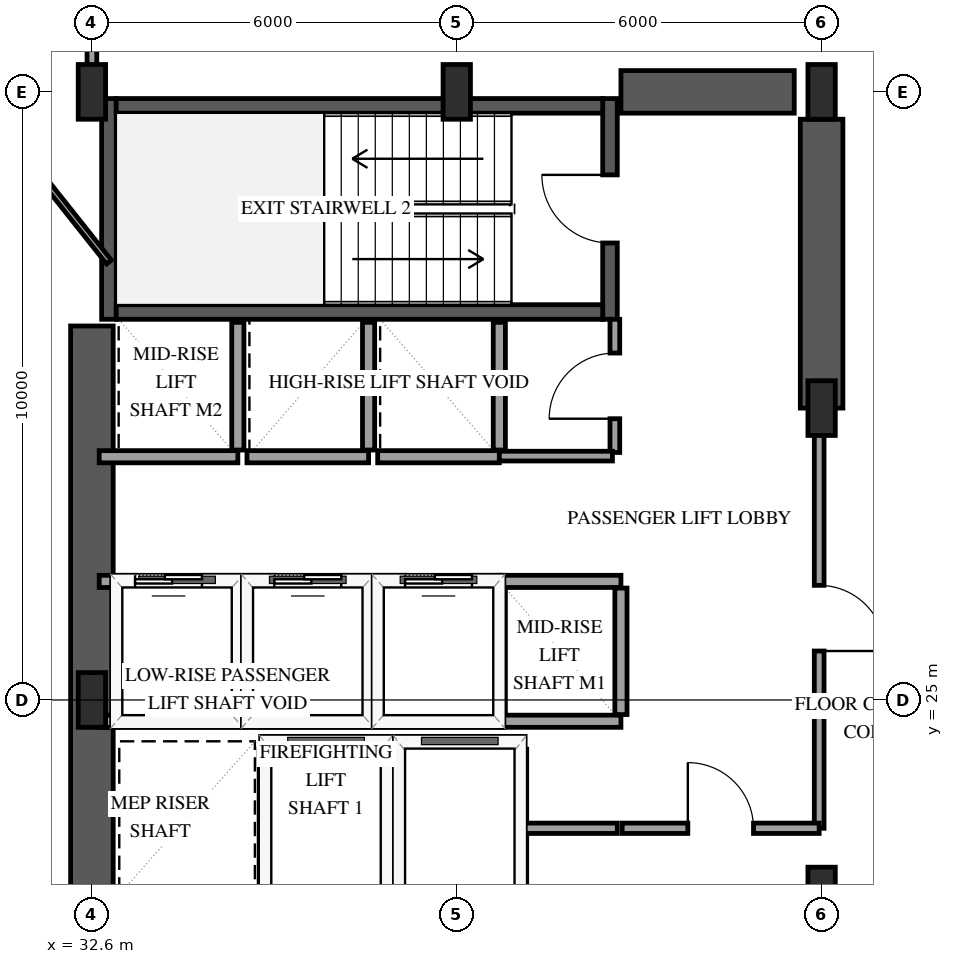
"""IFC4 building model, lengths in metres.
Left out: names, types, materials, properties, quantities, classifications, styles, units other than length and angle.
Written with IfcOpenShell. Run it as: python <this file> out.ifc"""

import sys

from ifc_helpers import new_model, si_unit, direction, frame, frame_2d, origin, origin_2d, place, context, subcontext, project, spatial, rectangle, extrude, element, fill, save


model = new_model("IFC4")
c1 = context("Model", 3, precision=1e-05, world=origin(), true_north=direction((0.0, 1.0)))
c2 = subcontext(c1, "Body", "Model", "MODEL_VIEW")
j1 = project(units=[si_unit("LENGTHUNIT", "METRE"), si_unit("PLANEANGLEUNIT", "RADIAN")], contexts=[c1])
p1 = place(None, origin())
s1 = spatial("IfcSite", under=j1, at=p1, CompositionType="ELEMENT")
p2 = place(p1, origin())
s2 = spatial("IfcBuilding", under=s1, at=p2, CompositionType="ELEMENT")
p3 = place(p2, frame((0.0, 0.0, 42.6)))
s3 = spatial("IfcBuildingStorey", under=s2, at=p3, CompositionType="ELEMENT", Elevation=42.6)
p4 = place(p3, frame((32.88, 31.26, 0.0), z_axis=(0.0, 0.0, 1.0), x_axis=(0.0, 1.0, 0.0)))
e1 = element("IfcWall", 1, at=p4, inside=s3, PredefinedType="SHEAR", context=c2, shape_type="SweptSolid", body=[
    extrude(rectangle(XDim=3.63, YDim=0.24, at=frame_2d((1.815, 0.0))), origin(), (0.0, 0.0, 1.0), 4.0),
])
p5 = place(p3, frame((41.12, 31.26, 0.0), z_axis=(0.0, 0.0, 1.0), x_axis=(0.0, 1.0, 0.0)))
e2 = element("IfcWall", 2, at=p5, inside=s3, PredefinedType="SHEAR", context=c2, shape_type="SweptSolid", body=[
    extrude(rectangle(XDim=3.63, YDim=0.24, at=frame_2d((1.815, 0.0))), origin(), (0.0, 0.0, 1.0), 4.0),
])
p6 = place(p5, frame((1.255, 0.0, 0.0)))
e3 = element("IfcOpeningElement", 3, at=p6, cuts=e2, PredefinedType="OPENING", context=c2, shape_type="SweptSolid", body=[
    extrude(rectangle(XDim=1.12, YDim=2.15, at=frame_2d((0.56, 1.075))), frame((0.0, 0.13, 0.0), z_axis=(0.0, -1.0, 0.0), x_axis=(1.0, 0.0, 0.0)), (0.0, 0.0, 1.0), 0.26),
])
for number, where, z_axis, x_axis in (
    (4, (33.0, 31.38, 0.0), (0.0, 0.0, 1.0), (1.0, 0.0, 0.0)),
    (5, (33.0, 34.77, 0.0), (0.0, 0.0, 1.0), (1.0, 0.0, 0.0)),
):
    element("IfcWall", number, at=place(p3, frame(where, z_axis=z_axis, x_axis=x_axis)), inside=s3, PredefinedType="SHEAR", context=c2, shape_type="SweptSolid", body=[
        extrude(rectangle(XDim=8.0, YDim=0.24, at=frame_2d((4.0, 0.0))), origin(), (0.0, 0.0, 1.0), 4.0),
    ])
p7 = place(p3, frame((32.6, 18.85, 0.0), z_axis=(0.0, 0.0, 1.0), x_axis=(0.0, 1.0, 0.0)))
e6 = element("IfcWall", 6, at=p7, inside=s3, PredefinedType="SHEAR", context=c2, shape_type="SweptSolid", body=[
    extrude(rectangle(XDim=12.3, YDim=0.7, at=frame_2d((6.15, 0.0))), origin(), (0.0, 0.0, 1.0), 4.0),
])
p8 = place(p3, frame((41.3, 35.0, 0.0), z_axis=(0.0, 0.0, 1.0), x_axis=(1.0, 0.0, 0.0)))
e7 = element("IfcWall", 7, at=p8, inside=s3, PredefinedType="SHEAR", context=c2, shape_type="SweptSolid", body=[
    extrude(rectangle(XDim=2.85, YDim=0.7, at=frame_2d((1.425, 0.0))), origin(), (0.0, 0.0, 1.0), 4.0),
])
p9 = place(p3, frame((44.6, 29.8, 0.0), z_axis=(0.0, 0.0, 1.0), x_axis=(0.0, 1.0, 0.0)))
e8 = element("IfcWall", 8, at=p9, inside=s3, PredefinedType="SHEAR", context=c2, shape_type="SweptSolid", body=[
    extrude(rectangle(XDim=4.75, YDim=0.7, at=frame_2d((2.375, 0.0))), origin(), (0.0, 0.0, 1.0), 4.0),
])
for number, where, z_axis, x_axis in (
    (9, (32.6, 25.0, 0.0), (0.0, 0.0, 1.0), (1.0, 0.0, 0.0)),
    (10, (32.6, 35.0, 0.0), (0.0, 0.0, 1.0), (1.0, 0.0, 0.0)),
    (11, (38.6, 35.0, 0.0), (0.0, 0.0, 1.0), (1.0, 0.0, 0.0)),
    (12, (44.6, 21.8, 0.0), (0.0, 0.0, 1.0), (1.0, 0.0, 0.0)),
    (13, (44.6, 29.8, 0.0), (0.0, 0.0, 1.0), (1.0, 0.0, 0.0)),
    (14, (44.6, 35.0, 0.0), (0.0, 0.0, 1.0), (1.0, 0.0, 0.0)),
):
    element("IfcColumn", number, at=place(p3, frame(where, z_axis=z_axis, x_axis=x_axis)), inside=s3, PredefinedType="PILASTER", context=c2, shape_type="SweptSolid", body=[
        extrude(rectangle(XDim=0.45, YDim=0.9, at=origin_2d()), origin(), (0.0, 0.0, 1.0), 4.0),
    ])
p10 = place(p3, frame((35.45, 24.3, 0.0), z_axis=(0.0, 0.0, 1.0), x_axis=(1.0, 0.0, 0.0)))
e15 = element("IfcWall", 15, at=p10, inside=s3, PredefinedType="SOLIDWALL", context=c2, shape_type="SweptSolid", body=[
    extrude(rectangle(XDim=2.0, YDim=0.2, at=frame_2d((1.0, 0.0))), origin(), (0.0, 0.0, 1.0), 3.7),
])
for number, where, z_axis, x_axis in (
    (16, (35.45, 21.81, 0.0), (0.0, 0.0, 1.0), (0.0, 1.0, 0.0)),
    (17, (37.45, 21.81, 0.0), (0.0, 0.0, 1.0), (0.0, 1.0, 0.0)),
):
    element("IfcWall", number, at=place(p3, frame(where, z_axis=z_axis, x_axis=x_axis)), inside=s3, PredefinedType="SOLIDWALL", context=c2, shape_type="SweptSolid", body=[
        extrude(rectangle(XDim=2.38, YDim=0.2, at=frame_2d((1.19, 0.0))), origin(), (0.0, 0.0, 1.0), 3.7),
    ])
p11 = place(p3, frame((37.65, 24.3, 0.0), z_axis=(0.0, 0.0, 1.0), x_axis=(1.0, 0.0, 0.0)))
e18 = element("IfcWall", 18, at=p11, inside=s3, PredefinedType="SOLIDWALL", context=c2, shape_type="SweptSolid", body=[
    extrude(rectangle(XDim=2.0, YDim=0.2, at=frame_2d((1.0, 0.0))), origin(), (0.0, 0.0, 1.0), 3.7),
])
p12 = place(p3, frame((39.65, 21.81, 0.0), z_axis=(0.0, 0.0, 1.0), x_axis=(0.0, 1.0, 0.0)))
e19 = element("IfcWall", 19, at=p12, inside=s3, PredefinedType="SOLIDWALL", context=c2, shape_type="SweptSolid", body=[
    extrude(rectangle(XDim=2.38, YDim=0.2, at=frame_2d((1.19, 0.0))), origin(), (0.0, 0.0, 1.0), 3.7),
])
p13 = place(p3, frame((32.72, 24.65, 0.0), z_axis=(0.0, 0.0, 1.0), x_axis=(1.0, 0.0, 0.0)))
e20 = element("IfcWall", 20, at=p13, inside=s3, PredefinedType="SOLIDWALL", context=c2, shape_type="SweptSolid", body=[
    extrude(rectangle(XDim=2.28, YDim=0.2, at=frame_2d((1.14, 0.0))), origin(), (0.0, 0.0, 1.0), 3.7),
])
p14 = place(p3, frame((32.72, 26.95, 0.0), z_axis=(0.0, 0.0, 1.0), x_axis=(1.0, 0.0, 0.0)))
e21 = element("IfcWall", 21, at=p14, inside=s3, PredefinedType="SOLIDWALL", context=c2, shape_type="SweptSolid", body=[
    extrude(rectangle(XDim=2.28, YDim=0.2, at=frame_2d((1.14, 0.0))), origin(), (0.0, 0.0, 1.0), 3.7),
])
p15 = place(p14, frame((0.59, 0.0, 0.0)))
e22 = element("IfcOpeningElement", 22, at=p15, cuts=e21, PredefinedType="OPENING", context=c2, shape_type="SweptSolid", body=[
    extrude(rectangle(XDim=1.1, YDim=2.15, at=frame_2d((0.55, 1.075))), frame((0.0, 0.11, 0.0), z_axis=(0.0, -1.0, 0.0), x_axis=(1.0, 0.0, 0.0)), (0.0, 0.0, 1.0), 0.22),
])
p16 = place(p3, frame((35.0, 24.76, 0.0), z_axis=(0.0, 0.0, 1.0), x_axis=(0.0, 1.0, 0.0)))
e23 = element("IfcWall", 23, at=p16, inside=s3, PredefinedType="SOLIDWALL", context=c2, shape_type="SweptSolid", body=[
    extrude(rectangle(XDim=2.08, YDim=0.2, at=frame_2d((1.04, 0.0))), origin(), (0.0, 0.0, 1.0), 3.7),
])
p17 = place(p3, frame((35.15, 24.65, 0.0), z_axis=(0.0, 0.0, 1.0), x_axis=(1.0, 0.0, 0.0)))
e24 = element("IfcWall", 24, at=p17, inside=s3, PredefinedType="SOLIDWALL", context=c2, shape_type="SweptSolid", body=[
    extrude(rectangle(XDim=2.0, YDim=0.2, at=frame_2d((1.0, 0.0))), origin(), (0.0, 0.0, 1.0), 3.7),
])
p18 = place(p3, frame((35.15, 26.95, 0.0), z_axis=(0.0, 0.0, 1.0), x_axis=(1.0, 0.0, 0.0)))
e25 = element("IfcWall", 25, at=p18, inside=s3, PredefinedType="SOLIDWALL", context=c2, shape_type="SweptSolid", body=[
    extrude(rectangle(XDim=2.0, YDim=0.2, at=frame_2d((1.0, 0.0))), origin(), (0.0, 0.0, 1.0), 3.7),
])
p19 = place(p18, frame((0.45, 0.0, 0.0)))
e26 = element("IfcOpeningElement", 26, at=p19, cuts=e25, PredefinedType="OPENING", context=c2, shape_type="SweptSolid", body=[
    extrude(rectangle(XDim=1.1, YDim=2.15, at=frame_2d((0.55, 1.075))), frame((0.0, 0.11, 0.0), z_axis=(0.0, -1.0, 0.0), x_axis=(1.0, 0.0, 0.0)), (0.0, 0.0, 1.0), 0.22),
])
p20 = place(p3, frame((37.15, 24.76, 0.0), z_axis=(0.0, 0.0, 1.0), x_axis=(0.0, 1.0, 0.0)))
e27 = element("IfcWall", 27, at=p20, inside=s3, PredefinedType="SOLIDWALL", context=c2, shape_type="SweptSolid", body=[
    extrude(rectangle(XDim=2.08, YDim=0.2, at=frame_2d((1.04, 0.0))), origin(), (0.0, 0.0, 1.0), 3.7),
])
p21 = place(p3, frame((37.3, 24.65, 0.0), z_axis=(0.0, 0.0, 1.0), x_axis=(1.0, 0.0, 0.0)))
e28 = element("IfcWall", 28, at=p21, inside=s3, PredefinedType="SOLIDWALL", context=c2, shape_type="SweptSolid", body=[
    extrude(rectangle(XDim=2.0, YDim=0.2, at=frame_2d((1.0, 0.0))), origin(), (0.0, 0.0, 1.0), 3.7),
])
p22 = place(p3, frame((37.3, 26.95, 0.0), z_axis=(0.0, 0.0, 1.0), x_axis=(1.0, 0.0, 0.0)))
e29 = element("IfcWall", 29, at=p22, inside=s3, PredefinedType="SOLIDWALL", context=c2, shape_type="SweptSolid", body=[
    extrude(rectangle(XDim=2.0, YDim=0.2, at=frame_2d((1.0, 0.0))), origin(), (0.0, 0.0, 1.0), 3.7),
])
p23 = place(p22, frame((0.45, 0.0, 0.0)))
e30 = element("IfcOpeningElement", 30, at=p23, cuts=e29, PredefinedType="OPENING", context=c2, shape_type="SweptSolid", body=[
    extrude(rectangle(XDim=1.1, YDim=2.15, at=frame_2d((0.55, 1.075))), frame((0.0, 0.11, 0.0), z_axis=(0.0, -1.0, 0.0), x_axis=(1.0, 0.0, 0.0)), (0.0, 0.0, 1.0), 0.22),
])
p24 = place(p3, frame((39.3, 24.76, 0.0), z_axis=(0.0, 0.0, 1.0), x_axis=(0.0, 1.0, 0.0)))
e31 = element("IfcWall", 31, at=p24, inside=s3, PredefinedType="SOLIDWALL", context=c2, shape_type="SweptSolid", body=[
    extrude(rectangle(XDim=2.08, YDim=0.2, at=frame_2d((1.04, 0.0))), origin(), (0.0, 0.0, 1.0), 3.7),
])
for number, where, z_axis, x_axis in (
    (32, (39.3, 24.65, 0.0), (0.0, 0.0, 1.0), (1.0, 0.0, 0.0)),
    (33, (39.3, 26.95, 0.0), (0.0, 0.0, 1.0), (1.0, 0.0, 0.0)),
):
    element("IfcWall", number, at=place(p3, frame(where, z_axis=z_axis, x_axis=x_axis)), inside=s3, PredefinedType="SOLIDWALL", context=c2, shape_type="SweptSolid", body=[
        extrude(rectangle(XDim=2.0, YDim=0.2, at=frame_2d((1.0, 0.0))), origin(), (0.0, 0.0, 1.0), 3.7),
    ])
p25 = place(p3, frame((41.3, 24.76, 0.0), z_axis=(0.0, 0.0, 1.0), x_axis=(0.0, 1.0, 0.0)))
e34 = element("IfcWall", 34, at=p25, inside=s3, PredefinedType="SOLIDWALL", context=c2, shape_type="SweptSolid", body=[
    extrude(rectangle(XDim=2.08, YDim=0.2, at=frame_2d((1.04, 0.0))), origin(), (0.0, 0.0, 1.0), 3.7),
])
p26 = place(p3, frame((32.72, 29.0, 0.0), z_axis=(0.0, 0.0, 1.0), x_axis=(1.0, 0.0, 0.0)))
e35 = element("IfcWall", 35, at=p26, inside=s3, PredefinedType="SOLIDWALL", context=c2, shape_type="SweptSolid", body=[
    extrude(rectangle(XDim=2.28, YDim=0.2, at=frame_2d((1.14, 0.0))), origin(), (0.0, 0.0, 1.0), 3.7),
])
p27 = place(p3, frame((35.0, 29.11, 0.0), z_axis=(0.0, 0.0, 1.0), x_axis=(0.0, 1.0, 0.0)))
e36 = element("IfcWall", 36, at=p27, inside=s3, PredefinedType="SOLIDWALL", context=c2, shape_type="SweptSolid", body=[
    extrude(rectangle(XDim=2.1, YDim=0.2, at=frame_2d((1.05, 0.0))), origin(), (0.0, 0.0, 1.0), 3.7),
])
p28 = place(p3, frame((35.15, 29.0, 0.0), z_axis=(0.0, 0.0, 1.0), x_axis=(1.0, 0.0, 0.0)))
e37 = element("IfcWall", 37, at=p28, inside=s3, PredefinedType="SOLIDWALL", context=c2, shape_type="SweptSolid", body=[
    extrude(rectangle(XDim=2.0, YDim=0.2, at=frame_2d((1.0, 0.0))), origin(), (0.0, 0.0, 1.0), 3.7),
])
p29 = place(p3, frame((37.15, 29.11, 0.0), z_axis=(0.0, 0.0, 1.0), x_axis=(0.0, 1.0, 0.0)))
e38 = element("IfcWall", 38, at=p29, inside=s3, PredefinedType="SOLIDWALL", context=c2, shape_type="SweptSolid", body=[
    extrude(rectangle(XDim=2.1, YDim=0.2, at=frame_2d((1.05, 0.0))), origin(), (0.0, 0.0, 1.0), 3.7),
])
p30 = place(p3, frame((37.3, 29.0, 0.0), z_axis=(0.0, 0.0, 1.0), x_axis=(1.0, 0.0, 0.0)))
e39 = element("IfcWall", 39, at=p30, inside=s3, PredefinedType="SOLIDWALL", context=c2, shape_type="SweptSolid", body=[
    extrude(rectangle(XDim=2.0, YDim=0.2, at=frame_2d((1.0, 0.0))), origin(), (0.0, 0.0, 1.0), 3.7),
])
p31 = place(p3, frame((39.3, 29.11, 0.0), z_axis=(0.0, 0.0, 1.0), x_axis=(0.0, 1.0, 0.0)))
e40 = element("IfcWall", 40, at=p31, inside=s3, PredefinedType="SOLIDWALL", context=c2, shape_type="SweptSolid", body=[
    extrude(rectangle(XDim=2.1, YDim=0.2, at=frame_2d((1.05, 0.0))), origin(), (0.0, 0.0, 1.0), 3.7),
])
p32 = place(p3, frame((32.88, 32.202, 0.0), z_axis=(0.0, 0.0, 1.0), x_axis=(-0.621839537778, 0.783144679645, 0.0)))
e41 = element("IfcWall", 41, at=p32, inside=s3, PredefinedType="PARTITIONING", context=c2, shape_type="SweptSolid", body=[
    extrude(rectangle(XDim=7.132, YDim=0.1, at=frame_2d((3.566, 0.0))), origin(), (0.0, 0.0, 1.0), 3.7),
])
p33 = place(p3, frame((44.56, 29.8, 0.0), z_axis=(0.0, 0.0, 1.0), x_axis=(0.0, -1.0, 0.0)))
e42 = element("IfcWall", 42, at=p33, inside=s3, PredefinedType="PARTITIONING", context=c2, shape_type="SweptSolid", body=[
    extrude(rectangle(XDim=6.91, YDim=0.16, at=frame_2d((3.455, 0.0))), origin(), (0.0, 0.0, 1.0), 2.74),
])
p34 = place(p33, frame((2.915, 0.0, 0.0)))
e43 = element("IfcOpeningElement", 43, at=p34, cuts=e42, PredefinedType="OPENING", context=c2, shape_type="SweptSolid", body=[
    extrude(rectangle(XDim=1.08, YDim=2.15, at=frame_2d((0.54, 1.075))), frame((0.0, 0.09, 0.0), z_axis=(0.0, -1.0, 0.0), x_axis=(1.0, 0.0, 0.0)), (0.0, 0.0, 1.0), 0.18),
])
p35 = place(p3, frame((41.32, 22.89, 0.0), z_axis=(0.0, 0.0, 1.0), x_axis=(1.0, 0.0, 0.0)))
e44 = element("IfcWall", 44, at=p35, inside=s3, PredefinedType="PARTITIONING", context=c2, shape_type="SweptSolid", body=[
    extrude(rectangle(XDim=3.24, YDim=0.17, at=frame_2d((1.62, 0.0))), origin(), (0.0, 0.0, 1.0), 3.7),
])
p36 = place(p35, frame((1.08, 0.0, 0.0)))
e45 = element("IfcOpeningElement", 45, at=p36, cuts=e44, PredefinedType="OPENING", context=c2, shape_type="SweptSolid", body=[
    extrude(rectangle(XDim=1.08, YDim=2.15, at=frame_2d((0.54, 1.075))), frame((0.0, 0.095, 0.0), z_axis=(0.0, -1.0, 0.0), x_axis=(1.0, 0.0, 0.0)), (0.0, 0.0, 1.0), 0.19),
])
p37 = place(p3, frame((41.2, 29.07, 0.0), z_axis=(0.0, 0.0, 1.0), x_axis=(0.0, 1.0, 0.0)))
e46 = element("IfcWall", 46, at=p37, inside=s3, PredefinedType="PARTITIONING", context=c2, shape_type="SweptSolid", body=[
    extrude(rectangle(XDim=2.19, YDim=0.16, at=frame_2d((1.095, 0.0))), origin(), (0.0, 0.0, 1.0), 3.7),
])
p38 = place(p37, frame((0.555, 0.0, 0.0)))
e47 = element("IfcOpeningElement", 47, at=p38, cuts=e46, PredefinedType="OPENING", context=c2, shape_type="SweptSolid", body=[
    extrude(rectangle(XDim=1.08, YDim=2.15, at=frame_2d((0.54, 1.075))), frame((0.0, 0.09, 0.0), z_axis=(0.0, -1.0, 0.0), x_axis=(1.0, 0.0, 0.0)), (0.0, 0.0, 1.0), 0.18),
])
p39 = place(p3, frame((32.6, 35.07, 0.0), z_axis=(0.0, 0.0, 1.0), x_axis=(0.0, 1.0, 0.0)))
e48 = element("IfcWall", 48, at=p39, inside=s3, PredefinedType="PARTITIONING", context=c2, shape_type="SweptSolid", body=[
    extrude(rectangle(XDim=1.91, YDim=0.16, at=frame_2d((0.955, 0.0))), origin(), (0.0, 0.0, 1.0), 3.7),
])
p40 = place(p3, frame((39.3, 29.01, 0.0), z_axis=(0.0, 0.0, 1.0), x_axis=(1.0, 0.0, 0.0)))
e49 = element("IfcWall", 49, at=p40, inside=s3, PredefinedType="PARTITIONING", context=c2, shape_type="SweptSolid", body=[
    extrude(rectangle(XDim=1.86, YDim=0.16, at=frame_2d((0.93, 0.0))), origin(), (0.0, 0.0, 1.0), 3.7),
])
p41 = place(p3, frame((39.72, 22.89, 0.0), z_axis=(0.0, 0.0, 1.0), x_axis=(1.0, 0.0, 0.0)))
e50 = element("IfcWall", 50, at=p41, inside=s3, PredefinedType="PARTITIONING", context=c2, shape_type="SweptSolid", body=[
    extrude(rectangle(XDim=1.52, YDim=0.17, at=frame_2d((0.76, 0.0))), origin(), (0.0, 0.0, 1.0), 3.7),
])
p42 = place(p15, origin())
e51 = element("IfcDoor", 51, at=p42, inside=s3, OperationType="SLIDING_TO_LEFT", PredefinedType="DOOR", context=c2, shape_type="SweptSolid", body=[
    extrude(rectangle(XDim=1.1, YDim=2.15, at=frame_2d((0.55, 1.075))), frame((0.0, 0.025, 0.0), z_axis=(0.0, -1.0, 0.0), x_axis=(1.0, 0.0, 0.0)), (0.0, 0.0, 1.0), 0.05),
])
fill(e22, e51)
p43 = place(p19, origin())
e52 = element("IfcDoor", 52, at=p43, inside=s3, OperationType="SLIDING_TO_LEFT", PredefinedType="DOOR", context=c2, shape_type="SweptSolid", body=[
    extrude(rectangle(XDim=1.1, YDim=2.15, at=frame_2d((0.55, 1.075))), frame((0.0, 0.025, 0.0), z_axis=(0.0, -1.0, 0.0), x_axis=(1.0, 0.0, 0.0)), (0.0, 0.0, 1.0), 0.05),
])
fill(e26, e52)
p44 = place(p23, origin())
e53 = element("IfcDoor", 53, at=p44, inside=s3, OperationType="SLIDING_TO_LEFT", PredefinedType="DOOR", context=c2, shape_type="SweptSolid", body=[
    extrude(rectangle(XDim=1.1, YDim=2.15, at=frame_2d((0.55, 1.075))), frame((0.0, 0.025, 0.0), z_axis=(0.0, -1.0, 0.0), x_axis=(1.0, 0.0, 0.0)), (0.0, 0.0, 1.0), 0.05),
])
fill(e30, e53)
p45 = place(p6, origin())
e54 = element("IfcDoor", 54, at=p45, inside=s3, OperationType="SINGLE_SWING_RIGHT", PredefinedType="DOOR", context=c2, shape_type="SweptSolid", body=[
    extrude(rectangle(XDim=1.12, YDim=2.15, at=frame_2d((0.56, 1.075))), frame((0.0, 0.025, 0.0), z_axis=(0.0, -1.0, 0.0), x_axis=(1.0, 0.0, 0.0)), (0.0, 0.0, 1.0), 0.05),
])
fill(e3, e54)
p46 = place(p34, origin())
e55 = element("IfcDoor", 55, at=p46, inside=s3, OperationType="SINGLE_SWING_RIGHT", PredefinedType="DOOR", context=c2, shape_type="SweptSolid", body=[
    extrude(rectangle(XDim=1.08, YDim=2.15, at=frame_2d((0.54, 1.075))), frame((0.0, 0.025, 0.0), z_axis=(0.0, -1.0, 0.0), x_axis=(1.0, 0.0, 0.0)), (0.0, 0.0, 1.0), 0.05),
])
fill(e43, e55)
p47 = place(p36, origin())
e56 = element("IfcDoor", 56, at=p47, inside=s3, OperationType="SINGLE_SWING_LEFT", PredefinedType="DOOR", context=c2, shape_type="SweptSolid", body=[
    extrude(rectangle(XDim=1.08, YDim=2.15, at=frame_2d((0.54, 1.075))), frame((0.0, 0.025, 0.0), z_axis=(0.0, -1.0, 0.0), x_axis=(1.0, 0.0, 0.0)), (0.0, 0.0, 1.0), 0.05),
])
fill(e45, e56)
p48 = place(p38, origin())
e57 = element("IfcDoor", 57, at=p48, inside=s3, OperationType="SINGLE_SWING_LEFT", PredefinedType="DOOR", context=c2, shape_type="SweptSolid", body=[
    extrude(rectangle(XDim=1.08, YDim=2.15, at=frame_2d((0.54, 1.075))), frame((0.0, 0.025, 0.0), z_axis=(0.0, -1.0, 0.0), x_axis=(1.0, 0.0, 0.0)), (0.0, 0.0, 1.0), 0.05),
])
fill(e47, e57)
save(model, sys.argv[1])
